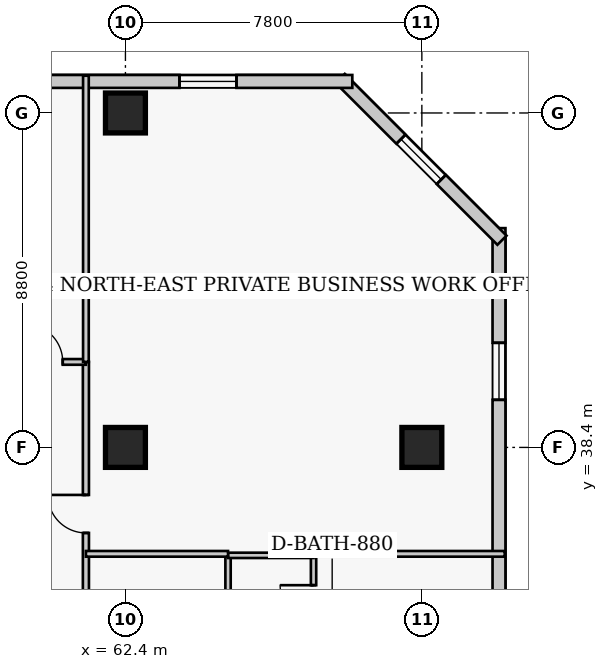
"""IFC4 building model, lengths in metres.
Left out: names, types, materials, properties, quantities, classifications, styles, units other than length and angle.
Written with IfcOpenShell. Run it as: python <this file> out.ifc"""

import sys

from ifc_helpers import new_model, si_unit, direction, frame, frame_2d, origin, origin_2d, place, context, subcontext, project, spatial, rectangle, extrude, element, fill, save


model = new_model("IFC4")
c1 = context("Model", 3, precision=1e-05, world=origin(), true_north=direction((0.0, 1.0)))
c2 = subcontext(c1, "Body", "Model", "MODEL_VIEW")
j1 = project(units=[si_unit("LENGTHUNIT", "METRE"), si_unit("PLANEANGLEUNIT", "RADIAN")], contexts=[c1])
p1 = place(None, origin())
s1 = spatial("IfcSite", under=j1, at=p1, CompositionType="ELEMENT")
p2 = place(p1, origin())
s2 = spatial("IfcBuilding", under=s1, at=p2, CompositionType="ELEMENT")
p3 = place(p2, frame((0.0, 0.0, 176.4)))
s3 = spatial("IfcBuildingStorey", under=s2, at=p3, CompositionType="ELEMENT", Elevation=176.4)
for number, where, z_axis, x_axis in (
    (1, (62.4, 38.4, 0.0), (0.0, 0.0, 1.0), (1.0, 0.0, 0.0)),
    (2, (62.4, 47.2, 0.0), (0.0, 0.0, 1.0), (1.0, 0.0, 0.0)),
    (3, (70.2, 38.4, 0.0), (0.0, 0.0, 1.0), (1.0, 0.0, 0.0)),
):
    element("IfcColumn", number, at=place(p3, frame(where, z_axis=z_axis, x_axis=x_axis)), inside=s3, PredefinedType="COLUMN", context=c2, shape_type="SweptSolid", body=[
        extrude(rectangle(XDim=1.05, YDim=1.05, at=origin_2d()), origin(), (0.0, 0.0, 1.0), 3.8),
    ])
p4 = place(p3, frame((72.23, 14.03, 0.0), z_axis=(0.0, 0.0, 1.0), x_axis=(0.0, 1.0, 0.0)))
e4 = element("IfcWall", 4, at=p4, inside=s3, PredefinedType="SOLIDWALL", context=c2, shape_type="SweptSolid", body=[
    extrude(rectangle(XDim=30.14, YDim=0.34, at=frame_2d((15.07, 0.0))), origin(), (0.0, 0.0, 1.0), 3.55),
])
p5 = place(p4, frame((3.018, 0.0, 0.85)))
e5 = element("IfcOpeningElement", 5, at=p5, cuts=e4, PredefinedType="OPENING", context=c2, shape_type="SweptSolid", body=[
    extrude(rectangle(XDim=1.5, YDim=1.75, at=frame_2d((0.75, 0.875))), frame((0.0, 0.18, 0.0), z_axis=(0.0, -1.0, 0.0), x_axis=(1.0, 0.0, 0.0)), (0.0, 0.0, 1.0), 0.36),
])
p6 = place(p4, frame((10.552, 0.0, 0.85)))
e6 = element("IfcOpeningElement", 6, at=p6, cuts=e4, PredefinedType="OPENING", context=c2, shape_type="SweptSolid", body=[
    extrude(rectangle(XDim=1.5, YDim=1.75, at=frame_2d((0.75, 0.875))), frame((0.0, 0.18, 0.0), z_axis=(0.0, -1.0, 0.0), x_axis=(1.0, 0.0, 0.0)), (0.0, 0.0, 1.0), 0.36),
])
p7 = place(p4, frame((18.087, 0.0, 0.85)))
e7 = element("IfcOpeningElement", 7, at=p7, cuts=e4, PredefinedType="OPENING", context=c2, shape_type="SweptSolid", body=[
    extrude(rectangle(XDim=1.5, YDim=1.75, at=frame_2d((0.75, 0.875))), frame((0.0, 0.18, 0.0), z_axis=(0.0, -1.0, 0.0), x_axis=(1.0, 0.0, 0.0)), (0.0, 0.0, 1.0), 0.36),
])
p8 = place(p4, frame((25.623, 0.0, 0.85)))
e8 = element("IfcOpeningElement", 8, at=p8, cuts=e4, PredefinedType="OPENING", context=c2, shape_type="SweptSolid", body=[
    extrude(rectangle(XDim=1.5, YDim=1.75, at=frame_2d((0.75, 0.875))), frame((0.0, 0.18, 0.0), z_axis=(0.0, -1.0, 0.0), x_axis=(1.0, 0.0, 0.0)), (0.0, 0.0, 1.0), 0.36),
])
p9 = place(p3, frame((72.308, 43.852, 0.0), z_axis=(0.0, 0.0, 1.0), x_axis=(-0.707106781187, 0.707106781187, 0.0)))
e9 = element("IfcWall", 9, at=p9, inside=s3, PredefinedType="SOLIDWALL", context=c2, shape_type="SweptSolid", body=[
    extrude(rectangle(XDim=6.02, YDim=0.34, at=frame_2d((3.01, 0.0))), origin(), (0.0, 0.0, 1.0), 3.55),
])
p10 = place(p9, frame((2.26, 0.0, 0.85)))
e10 = element("IfcOpeningElement", 10, at=p10, cuts=e9, PredefinedType="OPENING", context=c2, shape_type="SweptSolid", body=[
    extrude(rectangle(XDim=1.5, YDim=1.75, at=frame_2d((0.75, 0.875))), frame((0.0, 0.18, 0.0), z_axis=(0.0, -1.0, 0.0), x_axis=(1.0, 0.0, 0.0)), (0.0, 0.0, 1.0), 0.36),
])
p11 = place(p3, frame((68.37, 48.03, 0.0), z_axis=(0.0, 0.0, 1.0), x_axis=(-1.0, 0.0, 0.0)))
e11 = element("IfcWall", 11, at=p11, inside=s3, PredefinedType="SOLIDWALL", context=c2, shape_type="SweptSolid", body=[
    extrude(rectangle(XDim=26.69, YDim=0.34, at=frame_2d((13.345, 0.0))), origin(), (0.0, 0.0, 1.0), 3.55),
])
p12 = place(p11, frame((3.048, 0.0, 0.85)))
e12 = element("IfcOpeningElement", 12, at=p12, cuts=e11, PredefinedType="OPENING", context=c2, shape_type="SweptSolid", body=[
    extrude(rectangle(XDim=1.5, YDim=1.75, at=frame_2d((0.75, 0.875))), frame((0.0, 0.18, 0.0), z_axis=(0.0, -1.0, 0.0), x_axis=(1.0, 0.0, 0.0)), (0.0, 0.0, 1.0), 0.36),
])
p13 = place(p11, frame((11.445, 0.0, 0.85)))
e13 = element("IfcOpeningElement", 13, at=p13, cuts=e11, PredefinedType="OPENING", context=c2, shape_type="SweptSolid", body=[
    extrude(rectangle(XDim=1.5, YDim=1.75, at=frame_2d((0.75, 0.875))), frame((0.0, 0.18, 0.0), z_axis=(0.0, -1.0, 0.0), x_axis=(1.0, 0.0, 0.0)), (0.0, 0.0, 1.0), 0.36),
])
p14 = place(p11, frame((22.642, 0.0, 0.85)))
e14 = element("IfcOpeningElement", 14, at=p14, cuts=e11, PredefinedType="OPENING", context=c2, shape_type="SweptSolid", body=[
    extrude(rectangle(XDim=1.5, YDim=1.75, at=frame_2d((0.75, 0.875))), frame((0.0, 0.18, 0.0), z_axis=(0.0, -1.0, 0.0), x_axis=(1.0, 0.0, 0.0)), (0.0, 0.0, 1.0), 0.36),
])
p15 = place(p3, frame((61.36, 12.05, 0.0), z_axis=(0.0, 0.0, 1.0), x_axis=(0.0, 1.0, 0.0)))
e15 = element("IfcWall", 15, at=p15, inside=s3, PredefinedType="PARTITIONING", context=c2, shape_type="SweptSolid", body=[
    extrude(rectangle(XDim=28.6, YDim=0.16, at=frame_2d((14.3, 0.0))), origin(), (0.0, 0.0, 1.0), 3.55),
])
p16 = place(p15, frame((3.5, 0.0, 0.0)))
e16 = element("IfcOpeningElement", 16, at=p16, cuts=e15, PredefinedType="OPENING", context=c2, shape_type="SweptSolid", body=[
    extrude(rectangle(XDim=0.95, YDim=2.1, at=frame_2d((0.475, 1.05))), frame((0.0, 0.09, 0.0), z_axis=(0.0, -1.0, 0.0), x_axis=(1.0, 0.0, 0.0)), (0.0, 0.0, 1.0), 0.18),
])
p17 = place(p15, frame((11.875, 0.0, 0.0)))
e17 = element("IfcOpeningElement", 17, at=p17, cuts=e15, PredefinedType="OPENING", context=c2, shape_type="SweptSolid", body=[
    extrude(rectangle(XDim=0.95, YDim=2.1, at=frame_2d((0.475, 1.05))), frame((0.0, 0.09, 0.0), z_axis=(0.0, -1.0, 0.0), x_axis=(1.0, 0.0, 0.0)), (0.0, 0.0, 1.0), 0.18),
])
p18 = place(p15, frame((19.675, 0.0, 0.0)))
e18 = element("IfcOpeningElement", 18, at=p18, cuts=e15, PredefinedType="OPENING", context=c2, shape_type="SweptSolid", body=[
    extrude(rectangle(XDim=0.95, YDim=2.1, at=frame_2d((0.475, 1.05))), frame((0.0, 0.09, 0.0), z_axis=(0.0, -1.0, 0.0), x_axis=(1.0, 0.0, 0.0)), (0.0, 0.0, 1.0), 0.18),
])
p19 = place(p15, frame((24.1, 0.0, 0.0)))
e19 = element("IfcOpeningElement", 19, at=p19, cuts=e15, PredefinedType="OPENING", context=c2, shape_type="SweptSolid", body=[
    extrude(rectangle(XDim=1.0, YDim=2.15, at=frame_2d((0.5, 1.075))), frame((0.0, 0.09, 0.0), z_axis=(0.0, -1.0, 0.0), x_axis=(1.0, 0.0, 0.0)), (0.0, 0.0, 1.0), 0.18),
])
p20 = place(p3, frame((56.8, 40.65, 0.0), z_axis=(0.0, 0.0, 1.0), x_axis=(1.0, 0.0, 0.0)))
e20 = element("IfcWall", 20, at=p20, inside=s3, PredefinedType="PARTITIONING", context=c2, shape_type="SweptSolid", body=[
    extrude(rectangle(XDim=4.56, YDim=0.15, at=frame_2d((2.28, 0.0))), origin(), (0.0, 0.0, 1.0), 3.55),
])
p21 = place(p20, frame((2.95, 0.0, 0.0)))
e21 = element("IfcOpeningElement", 21, at=p21, cuts=e20, PredefinedType="OPENING", context=c2, shape_type="SweptSolid", body=[
    extrude(rectangle(XDim=1.0, YDim=2.15, at=frame_2d((0.5, 1.075))), frame((0.0, 0.085, 0.0), z_axis=(0.0, -1.0, 0.0), x_axis=(1.0, 0.0, 0.0)), (0.0, 0.0, 1.0), 0.17),
])
p22 = place(p3, frame((61.36, 40.65, 0.0), z_axis=(0.0, 0.0, 1.0), x_axis=(0.0, 1.0, 0.0)))
e22 = element("IfcWall", 22, at=p22, inside=s3, PredefinedType="PARTITIONING", context=c2, shape_type="SweptSolid", body=[
    extrude(rectangle(XDim=7.53, YDim=0.15, at=frame_2d((3.765, 0.0))), origin(), (0.0, 0.0, 1.0), 3.55),
])
p23 = place(p3, frame((65.1, 33.11, 0.0), z_axis=(0.0, 0.0, 1.0), x_axis=(0.0, 1.0, 0.0)))
e23 = element("IfcWall", 23, at=p23, inside=s3, PredefinedType="PLUMBINGWALL", context=c2, shape_type="SweptSolid", body=[
    extrude(rectangle(XDim=2.45, YDim=0.14, at=frame_2d((1.225, 0.0))), origin(), (0.0, 0.0, 1.0), 3.55),
])
p24 = place(p3, frame((67.35, 33.11, 0.0), z_axis=(0.0, 0.0, 1.0), x_axis=(0.0, 1.0, 0.0)))
e24 = element("IfcWall", 24, at=p24, inside=s3, PredefinedType="PLUMBINGWALL", context=c2, shape_type="SweptSolid", body=[
    extrude(rectangle(XDim=2.45, YDim=0.14, at=frame_2d((1.225, 0.0))), origin(), (0.0, 0.0, 1.0), 3.55),
])
p25 = place(p24, frame((0.785, 0.0, 0.0)))
e25 = element("IfcOpeningElement", 25, at=p25, cuts=e24, PredefinedType="OPENING", context=c2, shape_type="SweptSolid", body=[
    extrude(rectangle(XDim=0.88, YDim=2.05, at=frame_2d((0.44, 1.025))), frame((0.0, 0.08, 0.0), z_axis=(0.0, -1.0, 0.0), x_axis=(1.0, 0.0, 0.0)), (0.0, 0.0, 1.0), 0.16),
])
p26 = place(p3, frame((65.1, 35.56, 0.0), z_axis=(0.0, 0.0, 1.0), x_axis=(1.0, 0.0, 0.0)))
e26 = element("IfcWall", 26, at=p26, inside=s3, PredefinedType="PLUMBINGWALL", context=c2, shape_type="SweptSolid", body=[
    extrude(rectangle(XDim=2.25, YDim=0.14, at=frame_2d((1.125, 0.0))), origin(), (0.0, 0.0, 1.0), 3.55),
])
p27 = place(p3, frame((61.36, 35.6, 0.0), z_axis=(0.0, 0.0, 1.0), x_axis=(1.0, 0.0, 0.0)))
e27 = element("IfcWall", 27, at=p27, inside=s3, PredefinedType="PARTITIONING", context=c2, shape_type="SweptSolid", body=[
    extrude(rectangle(XDim=3.74, YDim=0.15, at=frame_2d((1.87, 0.0))), origin(), (0.0, 0.0, 1.0), 3.55),
])
p28 = place(p3, frame((67.35, 35.6, 0.0), z_axis=(0.0, 0.0, 1.0), x_axis=(1.0, 0.0, 0.0)))
e28 = element("IfcWall", 28, at=p28, inside=s3, PredefinedType="PARTITIONING", context=c2, shape_type="SweptSolid", body=[
    extrude(rectangle(XDim=5.03, YDim=0.15, at=frame_2d((2.515, 0.0))), origin(), (0.0, 0.0, 1.0), 3.55),
])
p29 = place(p8, origin())
e29 = element("IfcWindow", 29, at=p29, inside=s3, PartitioningType="SINGLE_PANEL", PredefinedType="WINDOW", context=c2, shape_type="SweptSolid", body=[
    extrude(rectangle(XDim=1.5, YDim=1.75, at=frame_2d((0.75, 0.875))), frame((0.0, 0.03, 0.0), z_axis=(0.0, -1.0, 0.0), x_axis=(1.0, 0.0, 0.0)), (0.0, 0.0, 1.0), 0.06),
])
fill(e8, e29)
p30 = place(p10, origin())
e30 = element("IfcWindow", 30, at=p30, inside=s3, PartitioningType="SINGLE_PANEL", PredefinedType="WINDOW", context=c2, shape_type="SweptSolid", body=[
    extrude(rectangle(XDim=1.5, YDim=1.75, at=frame_2d((0.75, 0.875))), frame((0.0, 0.03, 0.0), z_axis=(0.0, -1.0, 0.0), x_axis=(1.0, 0.0, 0.0)), (0.0, 0.0, 1.0), 0.06),
])
fill(e10, e30)
p31 = place(p12, origin())
e31 = element("IfcWindow", 31, at=p31, inside=s3, PartitioningType="SINGLE_PANEL", PredefinedType="WINDOW", context=c2, shape_type="SweptSolid", body=[
    extrude(rectangle(XDim=1.5, YDim=1.75, at=frame_2d((0.75, 0.875))), frame((0.0, 0.03, 0.0), z_axis=(0.0, -1.0, 0.0), x_axis=(1.0, 0.0, 0.0)), (0.0, 0.0, 1.0), 0.06),
])
fill(e12, e31)
p32 = place(p21, origin())
e32 = element("IfcDoor", 32, at=p32, inside=s3, OperationType="SINGLE_SWING_LEFT", PredefinedType="DOOR", context=c2, shape_type="SweptSolid", body=[
    extrude(rectangle(XDim=1.0, YDim=2.15, at=frame_2d((0.5, 1.075))), frame((0.0, 0.025, 0.0), z_axis=(0.0, -1.0, 0.0), x_axis=(1.0, 0.0, 0.0)), (0.0, 0.0, 1.0), 0.05),
])
fill(e21, e32)
p33 = place(p25, origin())
e33 = element("IfcDoor", 33, at=p33, inside=s3, OperationType="SINGLE_SWING_RIGHT", PredefinedType="DOOR", context=c2, shape_type="SweptSolid", body=[
    extrude(rectangle(XDim=0.88, YDim=2.05, at=frame_2d((0.44, 1.025))), frame((0.0, 0.025, 0.0), z_axis=(0.0, -1.0, 0.0), x_axis=(1.0, 0.0, 0.0)), (0.0, 0.0, 1.0), 0.05),
])
fill(e25, e33)
p34 = place(p19, origin())
e34 = element("IfcDoor", 34, at=p34, inside=s3, OperationType="SINGLE_SWING_RIGHT", PredefinedType="DOOR", context=c2, shape_type="SweptSolid", body=[
    extrude(rectangle(XDim=1.0, YDim=2.15, at=frame_2d((0.5, 1.075))), frame((0.0, 0.025, 0.0), z_axis=(0.0, -1.0, 0.0), x_axis=(1.0, 0.0, 0.0)), (0.0, 0.0, 1.0), 0.05),
])
fill(e19, e34)
save(model, sys.argv[1])
